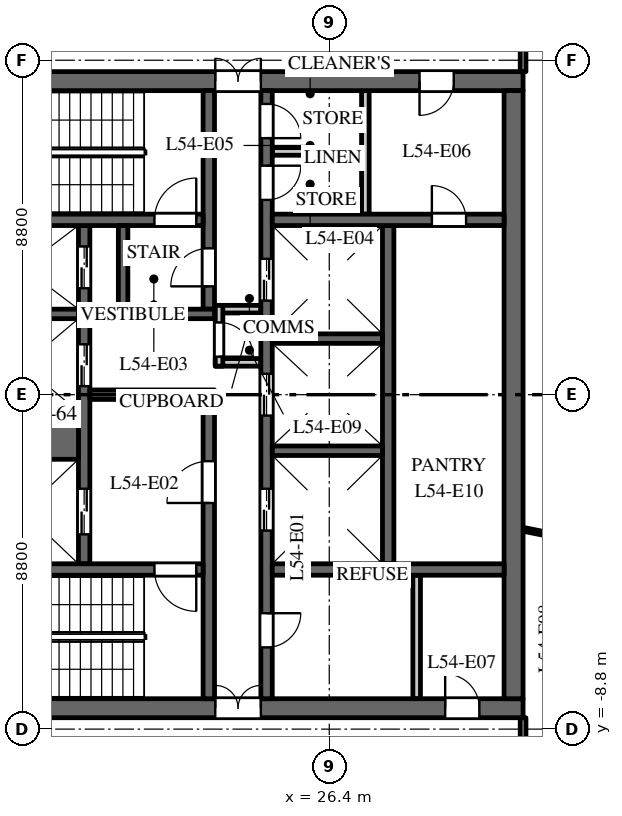
"""IFC4 building model, lengths in metres.
Left out: names, types, materials, properties, quantities, classifications, styles, units other than length and angle.
Written with IfcOpenShell. Run it as: python <this file> out.ifc"""

import sys

from ifc_helpers import new_model, si_unit, direction, frame, frame_2d, origin, place, context, subcontext, project, spatial, rectangle, extrude, element, fill, save


model = new_model("IFC4")
c1 = context("Model", 3, precision=1e-05, world=origin(), true_north=direction((0.0, 1.0)))
c2 = subcontext(c1, "Body", "Model", "MODEL_VIEW")
j1 = project(units=[si_unit("LENGTHUNIT", "METRE"), si_unit("PLANEANGLEUNIT", "RADIAN")], contexts=[c1])
p1 = place(None, origin())
s1 = spatial("IfcSite", under=j1, at=p1, CompositionType="ELEMENT")
p2 = place(p1, origin())
s2 = spatial("IfcBuilding", under=s1, at=p2, CompositionType="ELEMENT")
p3 = place(p2, frame((0.0, 0.0, 257.5)))
s3 = spatial("IfcBuildingStorey", under=s2, at=p3, CompositionType="ELEMENT", Elevation=257.5)
p4 = place(p3, frame((16.5, 8.25, 0.0), z_axis=(0.0, 0.0, 1.0), x_axis=(1.0, 0.0, 0.0)))
e1 = element("IfcWall", 1, at=p4, inside=s3, PredefinedType="SHEAR", context=c2, shape_type="SweptSolid", body=[
    extrude(rectangle(XDim=15.0, YDim=0.5, at=frame_2d((7.5, 0.0))), origin(), (0.0, 0.0, 1.0), 3.7),
])
p5 = place(p4, frame((6.9, 0.0, 0.0)))
e2 = element("IfcOpeningElement", 2, at=p5, cuts=e1, PredefinedType="OPENING", context=c2, shape_type="SweptSolid", body=[
    extrude(rectangle(XDim=1.2, YDim=2.1, at=frame_2d((0.6, 1.05))), frame((0.0, 0.26, 0.0), z_axis=(0.0, -1.0, 0.0), x_axis=(1.0, 0.0, 0.0)), (0.0, 0.0, 1.0), 0.52),
])
p6 = place(p4, frame((12.275, 0.0, 0.0)))
e3 = element("IfcOpeningElement", 3, at=p6, cuts=e1, PredefinedType="OPENING", context=c2, shape_type="SweptSolid", body=[
    extrude(rectangle(XDim=0.9, YDim=2.1, at=frame_2d((0.45, 1.05))), frame((0.0, 0.26, 0.0), z_axis=(0.0, -1.0, 0.0), x_axis=(1.0, 0.0, 0.0)), (0.0, 0.0, 1.0), 0.52),
])
p7 = place(p3, frame((16.5, -8.25, 0.0), z_axis=(0.0, 0.0, 1.0), x_axis=(1.0, 0.0, 0.0)))
e4 = element("IfcWall", 4, at=p7, inside=s3, PredefinedType="SHEAR", context=c2, shape_type="SweptSolid", body=[
    extrude(rectangle(XDim=15.0, YDim=0.5, at=frame_2d((7.5, 0.0))), origin(), (0.0, 0.0, 1.0), 3.7),
])
p8 = place(p7, frame((6.9, 0.0, 0.0)))
e5 = element("IfcOpeningElement", 5, at=p8, cuts=e4, PredefinedType="OPENING", context=c2, shape_type="SweptSolid", body=[
    extrude(rectangle(XDim=1.2, YDim=2.1, at=frame_2d((0.6, 1.05))), frame((0.0, 0.26, 0.0), z_axis=(0.0, -1.0, 0.0), x_axis=(1.0, 0.0, 0.0)), (0.0, 0.0, 1.0), 0.52),
])
p9 = place(p7, frame((12.95, 0.0, 0.0)))
e6 = element("IfcOpeningElement", 6, at=p9, cuts=e4, PredefinedType="OPENING", context=c2, shape_type="SweptSolid", body=[
    extrude(rectangle(XDim=0.9, YDim=2.1, at=frame_2d((0.45, 1.05))), frame((0.0, 0.26, 0.0), z_axis=(0.0, -1.0, 0.0), x_axis=(1.0, 0.0, 0.0)), (0.0, 0.0, 1.0), 0.52),
])
p10 = place(p3, frame((27.95, -4.45, 0.0), z_axis=(0.0, 0.0, 1.0), x_axis=(0.0, 1.0, 0.0)))
e7 = element("IfcWall", 7, at=p10, inside=s3, PredefinedType="SHEAR", context=c2, shape_type="SweptSolid", body=[
    extrude(rectangle(XDim=8.9, YDim=0.3, at=frame_2d((4.45, 0.0))), origin(), (0.0, 0.0, 1.0), 3.7),
])
p11 = place(p3, frame((19.95, -4.45, 0.0), z_axis=(0.0, 0.0, 1.0), x_axis=(0.0, 1.0, 0.0)))
e8 = element("IfcWall", 8, at=p11, inside=s3, PredefinedType="SHEAR", context=c2, shape_type="SweptSolid", body=[
    extrude(rectangle(XDim=8.9, YDim=0.3, at=frame_2d((4.45, 0.0))), origin(), (0.0, 0.0, 1.0), 3.7),
])
p12 = place(p11, frame((0.775, 0.0, 0.0)))
e9 = element("IfcOpeningElement", 9, at=p12, cuts=e8, PredefinedType="OPENING", context=c2, shape_type="SweptSolid", body=[
    extrude(rectangle(XDim=1.2, YDim=2.1, at=frame_2d((0.6, 1.05))), frame((0.0, 0.16, 0.0), z_axis=(0.0, -1.0, 0.0), x_axis=(1.0, 0.0, 0.0)), (0.0, 0.0, 1.0), 0.32),
])
p13 = place(p11, frame((4.675, 0.0, 0.0)))
e10 = element("IfcOpeningElement", 10, at=p13, cuts=e8, PredefinedType="OPENING", context=c2, shape_type="SweptSolid", body=[
    extrude(rectangle(XDim=1.1, YDim=2.1, at=frame_2d((0.55, 1.05))), frame((0.0, 0.16, 0.0), z_axis=(0.0, -1.0, 0.0), x_axis=(1.0, 0.0, 0.0)), (0.0, 0.0, 1.0), 0.32),
])
p14 = place(p11, frame((7.25, 0.0, 0.0)))
e11 = element("IfcOpeningElement", 11, at=p14, cuts=e8, PredefinedType="OPENING", context=c2, shape_type="SweptSolid", body=[
    extrude(rectangle(XDim=1.1, YDim=2.1, at=frame_2d((0.55, 1.05))), frame((0.0, 0.16, 0.0), z_axis=(0.0, -1.0, 0.0), x_axis=(1.0, 0.0, 0.0)), (0.0, 0.0, 1.0), 0.32),
])
p15 = place(p3, frame((24.75, -8.0, 0.0), z_axis=(0.0, 0.0, 1.0), x_axis=(0.0, 1.0, 0.0)))
e12 = element("IfcWall", 12, at=p15, inside=s3, PredefinedType="SHEAR", context=c2, shape_type="SweptSolid", body=[
    extrude(rectangle(XDim=16.0, YDim=0.3, at=frame_2d((8.0, 0.0))), origin(), (0.0, 0.0, 1.0), 3.7),
])
p16 = place(p15, frame((4.425, 0.0, 0.0)))
e13 = element("IfcOpeningElement", 13, at=p16, cuts=e12, PredefinedType="OPENING", context=c2, shape_type="SweptSolid", body=[
    extrude(rectangle(XDim=1.1, YDim=2.1, at=frame_2d((0.55, 1.05))), frame((0.0, 0.16, 0.0), z_axis=(0.0, -1.0, 0.0), x_axis=(1.0, 0.0, 0.0)), (0.0, 0.0, 1.0), 0.32),
])
p17 = place(p15, frame((7.45, 0.0, 0.0)))
e14 = element("IfcOpeningElement", 14, at=p17, cuts=e12, PredefinedType="OPENING", context=c2, shape_type="SweptSolid", body=[
    extrude(rectangle(XDim=1.1, YDim=2.1, at=frame_2d((0.55, 1.05))), frame((0.0, 0.16, 0.0), z_axis=(0.0, -1.0, 0.0), x_axis=(1.0, 0.0, 0.0)), (0.0, 0.0, 1.0), 0.32),
])
p18 = place(p15, frame((10.475, 0.0, 0.0)))
e15 = element("IfcOpeningElement", 15, at=p18, cuts=e12, PredefinedType="OPENING", context=c2, shape_type="SweptSolid", body=[
    extrude(rectangle(XDim=1.1, YDim=2.1, at=frame_2d((0.55, 1.05))), frame((0.0, 0.16, 0.0), z_axis=(0.0, -1.0, 0.0), x_axis=(1.0, 0.0, 0.0)), (0.0, 0.0, 1.0), 0.32),
])
p19 = place(p15, frame((13.125, 0.0, 0.0)))
e16 = element("IfcOpeningElement", 16, at=p19, cuts=e12, PredefinedType="OPENING", context=c2, shape_type="SweptSolid", body=[
    extrude(rectangle(XDim=0.9, YDim=2.1, at=frame_2d((0.45, 1.05))), frame((0.0, 0.16, 0.0), z_axis=(0.0, -1.0, 0.0), x_axis=(1.0, 0.0, 0.0)), (0.0, 0.0, 1.0), 0.32),
])
p20 = place(p15, frame((14.75, 0.0, 0.0)))
e17 = element("IfcOpeningElement", 17, at=p20, cuts=e12, PredefinedType="OPENING", context=c2, shape_type="SweptSolid", body=[
    extrude(rectangle(XDim=0.9, YDim=2.1, at=frame_2d((0.45, 1.05))), frame((0.0, 0.16, 0.0), z_axis=(0.0, -1.0, 0.0), x_axis=(1.0, 0.0, 0.0)), (0.0, 0.0, 1.0), 0.32),
])
p21 = place(p15, frame((1.35, 0.0, 0.0)))
e18 = element("IfcOpeningElement", 18, at=p21, cuts=e12, PredefinedType="OPENING", context=c2, shape_type="SweptSolid", body=[
    extrude(rectangle(XDim=0.9, YDim=2.1, at=frame_2d((0.45, 1.05))), frame((0.0, 0.16, 0.0), z_axis=(0.0, -1.0, 0.0), x_axis=(1.0, 0.0, 0.0)), (0.0, 0.0, 1.0), 0.32),
])
p22 = place(p3, frame((20.1, 0.0, 0.0), z_axis=(0.0, 0.0, 1.0), x_axis=(1.0, 0.0, 0.0)))
e19 = element("IfcWall", 19, at=p22, inside=s3, PredefinedType="SHEAR", context=c2, shape_type="SweptSolid", body=[
    extrude(rectangle(XDim=3.28, YDim=0.25, at=frame_2d((1.64, 0.0))), origin(), (0.0, 0.0, 1.0), 3.7),
])
for number, where, z_axis, x_axis in (
    (20, (23.4, 0.85, 0.0), (0.0, 0.0, 1.0), (1.0, 0.0, 0.0)),
    (21, (23.4, 2.25, 0.0), (0.0, 0.0, 1.0), (1.0, 0.0, 0.0)),
):
    element("IfcWall", number, at=place(p3, frame(where, z_axis=z_axis, x_axis=x_axis)), inside=s3, PredefinedType="PARTITIONING", context=c2, shape_type="SweptSolid", body=[
        extrude(rectangle(XDim=1.2, YDim=0.2, at=frame_2d((0.6, 0.0))), origin(), (0.0, 0.0, 1.0), 3.7),
    ])
p23 = place(p3, frame((23.5, 0.75, 0.0), z_axis=(0.0, 0.0, 1.0), x_axis=(0.0, 1.0, 0.0)))
e22 = element("IfcWall", 22, at=p23, inside=s3, PredefinedType="PARTITIONING", context=c2, shape_type="SweptSolid", body=[
    extrude(rectangle(XDim=1.6, YDim=0.2, at=frame_2d((0.8, 0.0))), origin(), (0.0, 0.0, 1.0), 3.7),
])
p24 = place(p23, frame((0.25, 0.0, 0.0)))
e23 = element("IfcOpeningElement", 23, at=p24, cuts=e22, PredefinedType="OPENING", context=c2, shape_type="SweptSolid", body=[
    extrude(rectangle(XDim=0.9, YDim=2.1, at=frame_2d((0.45, 1.05))), frame((0.0, 0.11, 0.0), z_axis=(0.0, -1.0, 0.0), x_axis=(1.0, 0.0, 0.0)), (0.0, 0.0, 1.0), 0.22),
])
p25 = place(p3, frame((31.25, -8.0, 0.0), z_axis=(0.0, 0.0, 1.0), x_axis=(0.0, 1.0, 0.0)))
e24 = element("IfcWall", 24, at=p25, inside=s3, PredefinedType="SHEAR", context=c2, shape_type="SweptSolid", body=[
    extrude(rectangle(XDim=16.0, YDim=0.5, at=frame_2d((8.0, 0.0))), origin(), (0.0, 0.0, 1.0), 3.7),
])
p26 = place(p3, frame((24.9, 4.6, 0.0), z_axis=(0.0, 0.0, 1.0), x_axis=(1.0, 0.0, 0.0)))
e25 = element("IfcWall", 25, at=p26, inside=s3, PredefinedType="SHEAR", context=c2, shape_type="SweptSolid", body=[
    extrude(rectangle(XDim=6.1, YDim=0.3, at=frame_2d((3.05, 0.0))), origin(), (0.0, 0.0, 1.0), 3.7),
])
p27 = place(p26, frame((4.2, 0.0, 0.0)))
e26 = element("IfcOpeningElement", 26, at=p27, cuts=e25, PredefinedType="OPENING", context=c2, shape_type="SweptSolid", body=[
    extrude(rectangle(XDim=0.9, YDim=2.1, at=frame_2d((0.45, 1.05))), frame((0.0, 0.16, 0.0), z_axis=(0.0, -1.0, 0.0), x_axis=(1.0, 0.0, 0.0)), (0.0, 0.0, 1.0), 0.32),
])
for number, where, z_axis, x_axis in (
    (27, (27.35, 4.75, 0.0), (0.0, 0.0, 1.0), (0.0, 1.0, 0.0)),
    (28, (28.7, -8.0, 0.0), (0.0, 0.0, 1.0), (0.0, 1.0, 0.0)),
):
    element("IfcWall", number, at=place(p3, frame(where, z_axis=z_axis, x_axis=x_axis)), inside=s3, PredefinedType="PARTITIONING", context=c2, shape_type="SweptSolid", body=[
        extrude(rectangle(XDim=3.25, YDim=0.2, at=frame_2d((1.625, 0.0))), origin(), (0.0, 0.0, 1.0), 3.7),
    ])
p28 = place(p3, frame((24.9, 6.4, 0.0), z_axis=(0.0, 0.0, 1.0), x_axis=(1.0, 0.0, 0.0)))
e29 = element("IfcWall", 29, at=p28, inside=s3, PredefinedType="PARTITIONING", context=c2, shape_type="SweptSolid", body=[
    extrude(rectangle(XDim=2.35, YDim=0.2, at=frame_2d((1.175, 0.0))), origin(), (0.0, 0.0, 1.0), 3.7),
])
p29 = place(p3, frame((24.9, -4.6, 0.0), z_axis=(0.0, 0.0, 1.0), x_axis=(1.0, 0.0, 0.0)))
e30 = element("IfcWall", 30, at=p29, inside=s3, PredefinedType="SHEAR", context=c2, shape_type="SweptSolid", body=[
    extrude(rectangle(XDim=6.1, YDim=0.3, at=frame_2d((3.05, 0.0))), origin(), (0.0, 0.0, 1.0), 3.7),
])
p30 = place(p3, frame((16.9, -1.075, 0.0), z_axis=(0.0, 0.0, 1.0), x_axis=(1.0, 0.0, 0.0)))
e31 = element("IfcWall", 31, at=p30, inside=s3, PredefinedType="SHEAR", context=c2, shape_type="SweptSolid", body=[
    extrude(rectangle(XDim=2.9, YDim=1.25, at=frame_2d((1.45, 0.0))), origin(), (0.0, 0.0, 1.0), 3.7),
])
for number, where, z_axis, x_axis in (
    (32, (16.9, 2.125, 0.0), (0.0, 0.0, 1.0), (1.0, 0.0, 0.0)),
    (33, (24.9, -1.475, 0.0), (0.0, 0.0, 1.0), (1.0, 0.0, 0.0)),
    (34, (24.9, 1.475, 0.0), (0.0, 0.0, 1.0), (1.0, 0.0, 0.0)),
):
    element("IfcWall", number, at=place(p3, frame(where, z_axis=z_axis, x_axis=x_axis)), inside=s3, PredefinedType="SHEAR", context=c2, shape_type="SweptSolid", body=[
        extrude(rectangle(XDim=2.9, YDim=0.25, at=frame_2d((1.45, 0.0))), origin(), (0.0, 0.0, 1.0), 3.7),
    ])
p31 = place(p3, frame((23.23, 2.25, 0.0), z_axis=(0.0, 0.0, 1.0), x_axis=(0.0, 1.0, 0.0)))
e35 = element("IfcWall", 35, at=p31, inside=s3, PredefinedType="SHEAR", context=c2, shape_type="SweptSolid", body=[
    extrude(rectangle(XDim=5.75, YDim=0.3, at=frame_2d((2.875, 0.0))), origin(), (0.0, 0.0, 1.0), 3.7),
])
p32 = place(p31, frame((0.6, 0.0, 0.0)))
e36 = element("IfcOpeningElement", 36, at=p32, cuts=e35, PredefinedType="OPENING", context=c2, shape_type="SweptSolid", body=[
    extrude(rectangle(XDim=1.0, YDim=2.1, at=frame_2d((0.5, 1.05))), frame((0.0, 0.16, 0.0), z_axis=(0.0, -1.0, 0.0), x_axis=(1.0, 0.0, 0.0)), (0.0, 0.0, 1.0), 0.32),
])
p33 = place(p3, frame((23.23, -8.0, 0.0), z_axis=(0.0, 0.0, 1.0), x_axis=(0.0, 1.0, 0.0)))
e37 = element("IfcWall", 37, at=p33, inside=s3, PredefinedType="SHEAR", context=c2, shape_type="SweptSolid", body=[
    extrude(rectangle(XDim=7.875, YDim=0.3, at=frame_2d((3.938, 0.0))), origin(), (0.0, 0.0, 1.0), 3.7),
])
p34 = place(p33, frame((5.15, 0.0, 0.0)))
e38 = element("IfcOpeningElement", 38, at=p34, cuts=e37, PredefinedType="OPENING", context=c2, shape_type="SweptSolid", body=[
    extrude(rectangle(XDim=1.1, YDim=2.1, at=frame_2d((0.55, 1.05))), frame((0.0, 0.16, 0.0), z_axis=(0.0, -1.0, 0.0), x_axis=(1.0, 0.0, 0.0)), (0.0, 0.0, 1.0), 0.32),
])
p35 = place(p3, frame((16.9, 4.6, 0.0), z_axis=(0.0, 0.0, 1.0), x_axis=(1.0, 0.0, 0.0)))
e39 = element("IfcWall", 39, at=p35, inside=s3, PredefinedType="SHEAR", context=c2, shape_type="SweptSolid", body=[
    extrude(rectangle(XDim=6.18, YDim=0.3, at=frame_2d((3.09, 0.0))), origin(), (0.0, 0.0, 1.0), 3.7),
])
p36 = place(p35, frame((4.9, 0.0, 0.0)))
e40 = element("IfcOpeningElement", 40, at=p36, cuts=e39, PredefinedType="OPENING", context=c2, shape_type="SweptSolid", body=[
    extrude(rectangle(XDim=1.1, YDim=2.1, at=frame_2d((0.55, 1.05))), frame((0.0, 0.16, 0.0), z_axis=(0.0, -1.0, 0.0), x_axis=(1.0, 0.0, 0.0)), (0.0, 0.0, 1.0), 0.32),
])
p37 = place(p3, frame((16.9, -4.6, 0.0), z_axis=(0.0, 0.0, 1.0), x_axis=(1.0, 0.0, 0.0)))
e41 = element("IfcWall", 41, at=p37, inside=s3, PredefinedType="SHEAR", context=c2, shape_type="SweptSolid", body=[
    extrude(rectangle(XDim=6.18, YDim=0.3, at=frame_2d((3.09, 0.0))), origin(), (0.0, 0.0, 1.0), 3.7),
])
p38 = place(p37, frame((4.9, 0.0, 0.0)))
e42 = element("IfcOpeningElement", 42, at=p38, cuts=e41, PredefinedType="OPENING", context=c2, shape_type="SweptSolid", body=[
    extrude(rectangle(XDim=1.1, YDim=2.1, at=frame_2d((0.55, 1.05))), frame((0.0, 0.16, 0.0), z_axis=(0.0, -1.0, 0.0), x_axis=(1.0, 0.0, 0.0)), (0.0, 0.0, 1.0), 0.32),
])
p39 = place(p3, frame((20.85, 2.125, 0.0), z_axis=(0.0, 0.0, 1.0), x_axis=(1.0, 0.0, 0.0)))
e43 = element("IfcWall", 43, at=p39, inside=s3, PredefinedType="SHEAR", context=c2, shape_type="SweptSolid", body=[
    extrude(rectangle(XDim=2.53, YDim=0.25, at=frame_2d((1.265, 0.0))), origin(), (0.0, 0.0, 1.0), 3.7),
])
p40 = place(p3, frame((20.975, 2.25, 0.0), z_axis=(0.0, 0.0, 1.0), x_axis=(0.0, 1.0, 0.0)))
e44 = element("IfcWall", 44, at=p40, inside=s3, PredefinedType="SHEAR", context=c2, shape_type="SweptSolid", body=[
    extrude(rectangle(XDim=2.2, YDim=0.25, at=frame_2d((1.1, 0.0))), origin(), (0.0, 0.0, 1.0), 3.7),
])
p41 = place(p3, frame((31.5, -10.7, 0.0), z_axis=(0.0, 0.0, 1.0), x_axis=(0.0, 1.0, 0.0)))
e45 = element("IfcWall", 45, at=p41, inside=s3, PredefinedType="PARTITIONING", context=c2, shape_type="SweptSolid", body=[
    extrude(rectangle(XDim=2.2, YDim=0.15, at=frame_2d((1.1, 0.0))), origin(), (0.0, 0.0, 1.0), 3.0),
])
p42 = place(p3, frame((31.5, -3.542, 0.0), z_axis=(0.0, 0.0, 1.0), x_axis=(0.980357474535, -0.197228857227, 0.0)))
e46 = element("IfcWall", 46, at=p42, inside=s3, PredefinedType="PARTITIONING", context=c2, shape_type="SweptSolid", body=[
    extrude(rectangle(XDim=4.092, YDim=0.1, at=frame_2d((2.046, 0.0))), origin(), (0.0, 0.0, 1.0), 3.0),
])
p43 = place(p3, frame((31.5, 8.5, 0.0), z_axis=(0.0, 0.0, 1.0), x_axis=(0.0, 1.0, 0.0)))
e47 = element("IfcWall", 47, at=p43, inside=s3, PredefinedType="PARTITIONING", context=c2, shape_type="SweptSolid", body=[
    extrude(rectangle(XDim=2.2, YDim=0.15, at=frame_2d((1.1, 0.0))), origin(), (0.0, 0.0, 1.0), 3.0),
])
p44 = place(p12, origin())
e48 = element("IfcDoor", 48, at=p44, inside=s3, OperationType="DOUBLE_DOOR_SLIDING", PredefinedType="DOOR", context=c2, shape_type="SweptSolid", body=[
    extrude(rectangle(XDim=1.2, YDim=2.1, at=frame_2d((0.6, 1.05))), frame((0.0, 0.025, 0.0), z_axis=(0.0, -1.0, 0.0), x_axis=(1.0, 0.0, 0.0)), (0.0, 0.0, 1.0), 0.05),
])
fill(e9, e48)
p45 = place(p13, origin())
e49 = element("IfcDoor", 49, at=p45, inside=s3, OperationType="DOUBLE_DOOR_SLIDING", PredefinedType="DOOR", context=c2, shape_type="SweptSolid", body=[
    extrude(rectangle(XDim=1.1, YDim=2.1, at=frame_2d((0.55, 1.05))), frame((0.0, 0.025, 0.0), z_axis=(0.0, -1.0, 0.0), x_axis=(1.0, 0.0, 0.0)), (0.0, 0.0, 1.0), 0.05),
])
fill(e10, e49)
p46 = place(p14, origin())
e50 = element("IfcDoor", 50, at=p46, inside=s3, OperationType="DOUBLE_DOOR_SLIDING", PredefinedType="DOOR", context=c2, shape_type="SweptSolid", body=[
    extrude(rectangle(XDim=1.1, YDim=2.1, at=frame_2d((0.55, 1.05))), frame((0.0, 0.025, 0.0), z_axis=(0.0, -1.0, 0.0), x_axis=(1.0, 0.0, 0.0)), (0.0, 0.0, 1.0), 0.05),
])
fill(e11, e50)
p47 = place(p16, origin())
e51 = element("IfcDoor", 51, at=p47, inside=s3, OperationType="DOUBLE_DOOR_SLIDING", PredefinedType="DOOR", context=c2, shape_type="SweptSolid", body=[
    extrude(rectangle(XDim=1.1, YDim=2.1, at=frame_2d((0.55, 1.05))), frame((0.0, 0.025, 0.0), z_axis=(0.0, -1.0, 0.0), x_axis=(1.0, 0.0, 0.0)), (0.0, 0.0, 1.0), 0.05),
])
fill(e13, e51)
p48 = place(p17, origin())
e52 = element("IfcDoor", 52, at=p48, inside=s3, OperationType="DOUBLE_DOOR_SLIDING", PredefinedType="DOOR", context=c2, shape_type="SweptSolid", body=[
    extrude(rectangle(XDim=1.1, YDim=2.1, at=frame_2d((0.55, 1.05))), frame((0.0, 0.025, 0.0), z_axis=(0.0, -1.0, 0.0), x_axis=(1.0, 0.0, 0.0)), (0.0, 0.0, 1.0), 0.05),
])
fill(e14, e52)
p49 = place(p18, origin())
e53 = element("IfcDoor", 53, at=p49, inside=s3, OperationType="DOUBLE_DOOR_SLIDING", PredefinedType="DOOR", context=c2, shape_type="SweptSolid", body=[
    extrude(rectangle(XDim=1.1, YDim=2.1, at=frame_2d((0.55, 1.05))), frame((0.0, 0.025, 0.0), z_axis=(0.0, -1.0, 0.0), x_axis=(1.0, 0.0, 0.0)), (0.0, 0.0, 1.0), 0.05),
])
fill(e15, e53)
p50 = place(p36, origin())
e54 = element("IfcDoor", 54, at=p50, inside=s3, OperationType="SINGLE_SWING_LEFT", PredefinedType="DOOR", context=c2, shape_type="SweptSolid", body=[
    extrude(rectangle(XDim=1.1, YDim=2.1, at=frame_2d((0.55, 1.05))), frame((0.0, 0.025, 0.0), z_axis=(0.0, -1.0, 0.0), x_axis=(1.0, 0.0, 0.0)), (0.0, 0.0, 1.0), 0.05),
])
fill(e40, e54)
p51 = place(p38, origin())
e55 = element("IfcDoor", 55, at=p51, inside=s3, OperationType="SINGLE_SWING_RIGHT", PredefinedType="DOOR", context=c2, shape_type="SweptSolid", body=[
    extrude(rectangle(XDim=1.1, YDim=2.1, at=frame_2d((0.55, 1.05))), frame((0.0, 0.025, 0.0), z_axis=(0.0, -1.0, 0.0), x_axis=(1.0, 0.0, 0.0)), (0.0, 0.0, 1.0), 0.05),
])
fill(e42, e55)
p52 = place(p34, origin())
e56 = element("IfcDoor", 56, at=p52, inside=s3, OperationType="SINGLE_SWING_RIGHT", PredefinedType="DOOR", context=c2, shape_type="SweptSolid", body=[
    extrude(rectangle(XDim=1.1, YDim=2.1, at=frame_2d((0.55, 1.05))), frame((0.0, 0.025, 0.0), z_axis=(0.0, -1.0, 0.0), x_axis=(1.0, 0.0, 0.0)), (0.0, 0.0, 1.0), 0.05),
])
fill(e38, e56)
p53 = place(p32, origin())
e57 = element("IfcDoor", 57, at=p53, inside=s3, OperationType="SINGLE_SWING_RIGHT", PredefinedType="DOOR", context=c2, shape_type="SweptSolid", body=[
    extrude(rectangle(XDim=1.0, YDim=2.1, at=frame_2d((0.5, 1.05))), frame((0.0, 0.025, 0.0), z_axis=(0.0, -1.0, 0.0), x_axis=(1.0, 0.0, 0.0)), (0.0, 0.0, 1.0), 0.05),
])
fill(e36, e57)
p54 = place(p5, origin())
e58 = element("IfcDoor", 58, at=p54, inside=s3, OperationType="DOUBLE_DOOR_DOUBLE_SWING", PredefinedType="DOOR", context=c2, shape_type="SweptSolid", body=[
    extrude(rectangle(XDim=1.2, YDim=2.1, at=frame_2d((0.6, 1.05))), frame((0.0, 0.025, 0.0), z_axis=(0.0, -1.0, 0.0), x_axis=(1.0, 0.0, 0.0)), (0.0, 0.0, 1.0), 0.05),
])
fill(e2, e58)
p55 = place(p8, origin())
e59 = element("IfcDoor", 59, at=p55, inside=s3, OperationType="DOUBLE_DOOR_DOUBLE_SWING", PredefinedType="DOOR", context=c2, shape_type="SweptSolid", body=[
    extrude(rectangle(XDim=1.2, YDim=2.1, at=frame_2d((0.6, 1.05))), frame((0.0, 0.025, 0.0), z_axis=(0.0, -1.0, 0.0), x_axis=(1.0, 0.0, 0.0)), (0.0, 0.0, 1.0), 0.05),
])
fill(e5, e59)
p56 = place(p19, origin())
e60 = element("IfcDoor", 60, at=p56, inside=s3, OperationType="SINGLE_SWING_RIGHT", PredefinedType="DOOR", context=c2, shape_type="SweptSolid", body=[
    extrude(rectangle(XDim=0.9, YDim=2.1, at=frame_2d((0.45, 1.05))), frame((0.0, 0.025, 0.0), z_axis=(0.0, -1.0, 0.0), x_axis=(1.0, 0.0, 0.0)), (0.0, 0.0, 1.0), 0.05),
])
fill(e16, e60)
p57 = place(p20, origin())
e61 = element("IfcDoor", 61, at=p57, inside=s3, OperationType="SINGLE_SWING_LEFT", PredefinedType="DOOR", context=c2, shape_type="SweptSolid", body=[
    extrude(rectangle(XDim=0.9, YDim=2.1, at=frame_2d((0.45, 1.05))), frame((0.0, 0.025, 0.0), z_axis=(0.0, -1.0, 0.0), x_axis=(1.0, 0.0, 0.0)), (0.0, 0.0, 1.0), 0.05),
])
fill(e17, e61)
p58 = place(p6, origin())
e62 = element("IfcDoor", 62, at=p58, inside=s3, OperationType="SINGLE_SWING_LEFT", PredefinedType="DOOR", context=c2, shape_type="SweptSolid", body=[
    extrude(rectangle(XDim=0.9, YDim=2.1, at=frame_2d((0.45, 1.05))), frame((0.0, 0.025, 0.0), z_axis=(0.0, -1.0, 0.0), x_axis=(1.0, 0.0, 0.0)), (0.0, 0.0, 1.0), 0.05),
])
fill(e3, e62)
p59 = place(p21, origin())
e63 = element("IfcDoor", 63, at=p59, inside=s3, OperationType="SINGLE_SWING_RIGHT", PredefinedType="DOOR", context=c2, shape_type="SweptSolid", body=[
    extrude(rectangle(XDim=0.9, YDim=2.1, at=frame_2d((0.45, 1.05))), frame((0.0, 0.025, 0.0), z_axis=(0.0, -1.0, 0.0), x_axis=(1.0, 0.0, 0.0)), (0.0, 0.0, 1.0), 0.05),
])
fill(e18, e63)
p60 = place(p9, origin())
e64 = element("IfcDoor", 64, at=p60, inside=s3, OperationType="SINGLE_SWING_RIGHT", PredefinedType="DOOR", context=c2, shape_type="SweptSolid", body=[
    extrude(rectangle(XDim=0.9, YDim=2.1, at=frame_2d((0.45, 1.05))), frame((0.0, 0.025, 0.0), z_axis=(0.0, -1.0, 0.0), x_axis=(1.0, 0.0, 0.0)), (0.0, 0.0, 1.0), 0.05),
])
fill(e6, e64)
p61 = place(p24, origin())
e65 = element("IfcDoor", 65, at=p61, inside=s3, OperationType="SINGLE_SWING_LEFT", PredefinedType="DOOR", context=c2, shape_type="SweptSolid", body=[
    extrude(rectangle(XDim=0.9, YDim=2.1, at=frame_2d((0.45, 1.05))), frame((0.0, 0.025, 0.0), z_axis=(0.0, -1.0, 0.0), x_axis=(1.0, 0.0, 0.0)), (0.0, 0.0, 1.0), 0.05),
])
fill(e23, e65)
p62 = place(p27, origin())
e66 = element("IfcDoor", 66, at=p62, inside=s3, OperationType="SINGLE_SWING_RIGHT", PredefinedType="DOOR", context=c2, shape_type="SweptSolid", body=[
    extrude(rectangle(XDim=0.9, YDim=2.1, at=frame_2d((0.45, 1.05))), frame((0.0, 0.025, 0.0), z_axis=(0.0, -1.0, 0.0), x_axis=(1.0, 0.0, 0.0)), (0.0, 0.0, 1.0), 0.05),
])
fill(e26, e66)
save(model, sys.argv[1])
